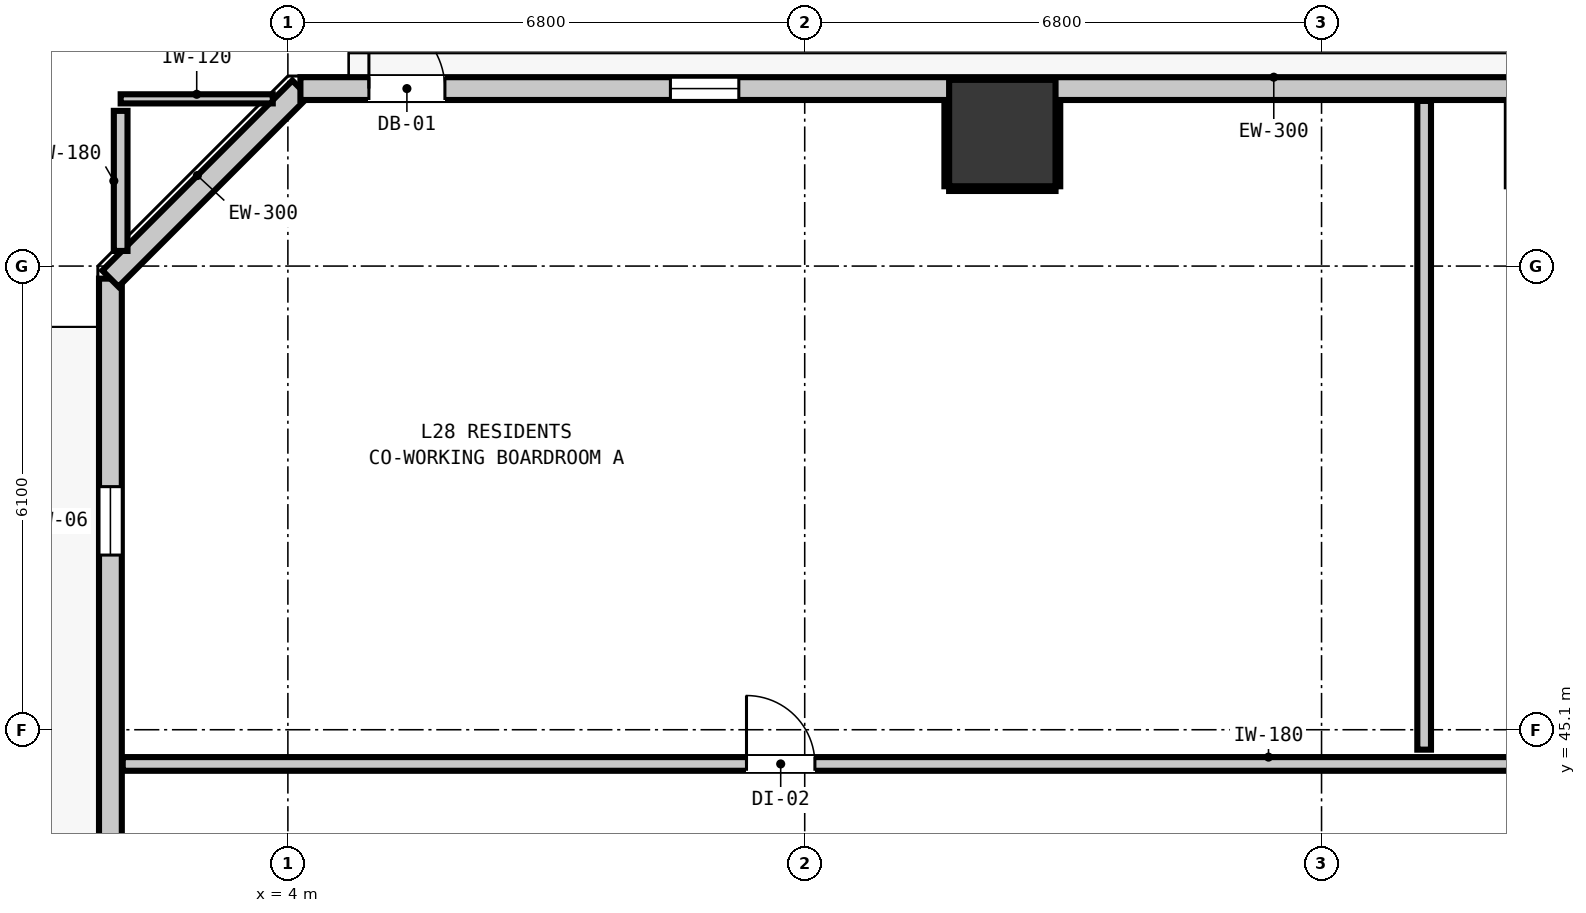
"""IFC4 building model, lengths in metres.
Left out: names, types, materials, properties, quantities, classifications, styles, units other than length and angle.
Written with IfcOpenShell. Run it as: python <this file> out.ifc"""

import sys

from ifc_helpers import new_model, si_unit, direction, frame, frame_2d, origin, origin_2d, place, context, subcontext, project, spatial, rectangle, extrude, element, fill, save


model = new_model("IFC4")
c1 = context("Model", 3, precision=1e-05, world=origin(), true_north=direction((0.0, 1.0)))
c2 = subcontext(c1, "Body", "Model", "MODEL_VIEW")
j1 = project(units=[si_unit("LENGTHUNIT", "METRE"), si_unit("PLANEANGLEUNIT", "RADIAN")], contexts=[c1])
p1 = place(None, origin())
s1 = spatial("IfcSite", under=j1, at=p1, CompositionType="ELEMENT")
p2 = place(p1, origin())
s2 = spatial("IfcBuilding", under=s1, at=p2, CompositionType="ELEMENT")
p3 = place(p2, frame((0.0, 0.0, 99.44)))
s3 = spatial("IfcBuildingStorey", under=s2, at=p3, CompositionType="ELEMENT", Elevation=99.44)
p4 = place(p3, frame((13.4, 52.95, 0.0), z_axis=(0.0, 0.0, 1.0), x_axis=(1.0, 0.0, 0.0)))
e1 = element("IfcColumn", 1, at=p4, inside=s3, PredefinedType="COLUMN", context=c2, shape_type="SweptSolid", body=[
    extrude(rectangle(XDim=1.4, YDim=1.4, at=origin_2d()), origin(), (0.0, 0.0, 1.0), 3.32),
])
p5 = place(p3, frame((1.665, 16.365, 0.0), z_axis=(0.0, 0.0, 1.0), x_axis=(0.0, 1.0, 0.0)))
e2 = element("IfcWall", 2, at=p5, inside=s3, PredefinedType="STANDARD", context=c2, shape_type="SweptSolid", body=[
    extrude(rectangle(XDim=34.67, YDim=0.3, at=frame_2d((17.335, 0.0))), origin(), (0.0, 0.0, 1.0), 3.06),
])
p6 = place(p5, frame((8.955, 0.0, 0.0)))
e3 = element("IfcOpeningElement", 3, at=p6, cuts=e2, PredefinedType="OPENING", context=c2, shape_type="SweptSolid", body=[
    extrude(rectangle(XDim=1.0, YDim=2.15, at=frame_2d((0.5, 1.075))), frame((0.0, 0.16, 0.0), z_axis=(0.0, -1.0, 0.0), x_axis=(1.0, 0.0, 0.0)), (0.0, 0.0, 1.0), 0.32),
])
p7 = place(p5, frame((31.033, 0.0, 0.85)))
e4 = element("IfcOpeningElement", 4, at=p7, cuts=e2, PredefinedType="OPENING", context=c2, shape_type="SweptSolid", body=[
    extrude(rectangle(XDim=0.9, YDim=1.5, at=frame_2d((0.45, 0.75))), frame((0.0, 0.16, 0.0), z_axis=(0.0, -1.0, 0.0), x_axis=(1.0, 0.0, 0.0)), (0.0, 0.0, 1.0), 0.32),
])
p8 = place(p5, frame((10.955, 0.0, 0.85)))
e5 = element("IfcOpeningElement", 5, at=p8, cuts=e2, PredefinedType="OPENING", context=c2, shape_type="SweptSolid", body=[
    extrude(rectangle(XDim=0.9, YDim=1.5, at=frame_2d((0.45, 0.75))), frame((0.0, 0.16, 0.0), z_axis=(0.0, -1.0, 0.0), x_axis=(1.0, 0.0, 0.0)), (0.0, 0.0, 1.0), 0.32),
])
p9 = place(p5, frame((15.485, 0.0, 0.85)))
e6 = element("IfcOpeningElement", 6, at=p9, cuts=e2, PredefinedType="OPENING", context=c2, shape_type="SweptSolid", body=[
    extrude(rectangle(XDim=0.9, YDim=1.5, at=frame_2d((0.45, 0.75))), frame((0.0, 0.16, 0.0), z_axis=(0.0, -1.0, 0.0), x_axis=(1.0, 0.0, 0.0)), (0.0, 0.0, 1.0), 0.32),
])
p10 = place(p3, frame((1.665, 51.035, 0.0), z_axis=(0.0, 0.0, 1.0), x_axis=(0.707106781187, 0.707106781187, 0.0)))
e7 = element("IfcWall", 7, at=p10, inside=s3, PredefinedType="STANDARD", context=c2, shape_type="SweptSolid", body=[
    extrude(rectangle(XDim=3.536, YDim=0.3, at=frame_2d((1.768, 0.0))), origin(), (0.0, 0.0, 1.0), 3.06),
])
p11 = place(p3, frame((4.165, 53.535, 0.0), z_axis=(0.0, 0.0, 1.0), x_axis=(1.0, 0.0, 0.0)))
e8 = element("IfcWall", 8, at=p11, inside=s3, PredefinedType="STANDARD", context=c2, shape_type="SweptSolid", body=[
    extrude(rectangle(XDim=37.47, YDim=0.3, at=frame_2d((18.735, 0.0))), origin(), (0.0, 0.0, 1.0), 3.06),
])
p12 = place(p11, frame((0.901, 0.0, 0.0)))
e9 = element("IfcOpeningElement", 9, at=p12, cuts=e8, PredefinedType="OPENING", context=c2, shape_type="SweptSolid", body=[
    extrude(rectangle(XDim=1.0, YDim=2.15, at=frame_2d((0.5, 1.075))), frame((0.0, 0.16, 0.0), z_axis=(0.0, -1.0, 0.0), x_axis=(1.0, 0.0, 0.0)), (0.0, 0.0, 1.0), 0.32),
])
p13 = place(p11, frame((4.868, 0.0, 0.85)))
e10 = element("IfcOpeningElement", 10, at=p13, cuts=e8, PredefinedType="OPENING", context=c2, shape_type="SweptSolid", body=[
    extrude(rectangle(XDim=0.9, YDim=1.5, at=frame_2d((0.45, 0.75))), frame((0.0, 0.16, 0.0), z_axis=(0.0, -1.0, 0.0), x_axis=(1.0, 0.0, 0.0)), (0.0, 0.0, 1.0), 0.32),
])
p14 = place(p11, frame((19.845, 0.0, 0.85)))
e11 = element("IfcOpeningElement", 11, at=p14, cuts=e8, PredefinedType="OPENING", context=c2, shape_type="SweptSolid", body=[
    extrude(rectangle(XDim=0.9, YDim=1.5, at=frame_2d((0.45, 0.75))), frame((0.0, 0.16, 0.0), z_axis=(0.0, -1.0, 0.0), x_axis=(1.0, 0.0, 0.0)), (0.0, 0.0, 1.0), 0.32),
])
p15 = place(p11, frame((29.567, 0.0, 0.85)))
e12 = element("IfcOpeningElement", 12, at=p15, cuts=e8, PredefinedType="OPENING", context=c2, shape_type="SweptSolid", body=[
    extrude(rectangle(XDim=0.9, YDim=1.5, at=frame_2d((0.45, 0.75))), frame((0.0, 0.16, 0.0), z_axis=(0.0, -1.0, 0.0), x_axis=(1.0, 0.0, 0.0)), (0.0, 0.0, 1.0), 0.32),
])
p16 = place(p11, frame((26.517, 0.0, 0.85)))
e13 = element("IfcOpeningElement", 13, at=p16, cuts=e8, PredefinedType="OPENING", context=c2, shape_type="SweptSolid", body=[
    extrude(rectangle(XDim=0.9, YDim=1.5, at=frame_2d((0.45, 0.75))), frame((0.0, 0.16, 0.0), z_axis=(0.0, -1.0, 0.0), x_axis=(1.0, 0.0, 0.0)), (0.0, 0.0, 1.0), 0.32),
])
p17 = place(p11, frame((35.653, 0.0, 0.85)))
e14 = element("IfcOpeningElement", 14, at=p17, cuts=e8, PredefinedType="OPENING", context=c2, shape_type="SweptSolid", body=[
    extrude(rectangle(XDim=0.9, YDim=1.5, at=frame_2d((0.45, 0.75))), frame((0.0, 0.16, 0.0), z_axis=(0.0, -1.0, 0.0), x_axis=(1.0, 0.0, 0.0)), (0.0, 0.0, 1.0), 0.32),
])
p18 = place(p3, frame((1.827, 44.65, 0.0), z_axis=(0.0, 0.0, 1.0), x_axis=(1.0, 0.0, 0.0)))
e15 = element("IfcWall", 15, at=p18, inside=s3, PredefinedType="PARTITIONING", context=c2, shape_type="SweptSolid", body=[
    extrude(rectangle(XDim=42.146, YDim=0.18, at=frame_2d((21.073, 0.0))), origin(), (0.0, 0.0, 1.0), 3.06),
])
p19 = place(p18, frame((8.207, 0.0, 0.0)))
e16 = element("IfcOpeningElement", 16, at=p19, cuts=e15, PredefinedType="OPENING", context=c2, shape_type="SweptSolid", body=[
    extrude(rectangle(XDim=0.9, YDim=2.1, at=frame_2d((0.45, 1.05))), frame((0.0, 0.1, 0.0), z_axis=(0.0, -1.0, 0.0), x_axis=(1.0, 0.0, 0.0)), (0.0, 0.0, 1.0), 0.2),
])
p20 = place(p18, frame((21.043, 0.0, 0.0)))
e17 = element("IfcOpeningElement", 17, at=p20, cuts=e15, PredefinedType="OPENING", context=c2, shape_type="SweptSolid", body=[
    extrude(rectangle(XDim=0.9, YDim=2.1, at=frame_2d((0.45, 1.05))), frame((0.0, 0.1, 0.0), z_axis=(0.0, -1.0, 0.0), x_axis=(1.0, 0.0, 0.0)), (0.0, 0.0, 1.0), 0.2),
])
p21 = place(p18, frame((33.351, 0.0, 0.0)))
e18 = element("IfcOpeningElement", 18, at=p21, cuts=e15, PredefinedType="OPENING", context=c2, shape_type="SweptSolid", body=[
    extrude(rectangle(XDim=1.0, YDim=2.15, at=frame_2d((0.5, 1.075))), frame((0.0, 0.1, 0.0), z_axis=(0.0, -1.0, 0.0), x_axis=(1.0, 0.0, 0.0)), (0.0, 0.0, 1.0), 0.2),
])
p22 = place(p3, frame((1.8, 53.4, 0.0), z_axis=(0.0, 0.0, 1.0), x_axis=(1.0, 0.0, 0.0)))
e19 = element("IfcWall", 19, at=p22, inside=s3, PredefinedType="PARTITIONING", context=c2, shape_type="SweptSolid", body=[
    extrude(rectangle(XDim=2.001, YDim=0.12, at=frame_2d((1.0, 0.0))), origin(), (0.0, 0.0, 1.0), 3.06),
])
p23 = place(p3, frame((1.8, 51.399, 0.0), z_axis=(0.0, 0.0, 1.0), x_axis=(0.0, 1.0, 0.0)))
e20 = element("IfcWall", 20, at=p23, inside=s3, PredefinedType="PARTITIONING", context=c2, shape_type="SweptSolid", body=[
    extrude(rectangle(XDim=1.843, YDim=0.18, at=frame_2d((0.921, 0.0))), origin(), (0.0, 0.0, 1.0), 3.06),
])
p24 = place(p3, frame((18.95, 44.838, 0.0), z_axis=(0.0, 0.0, 1.0), x_axis=(0.0, 1.0, 0.0)))
e21 = element("IfcWall", 21, at=p24, inside=s3, PredefinedType="PARTITIONING", context=c2, shape_type="SweptSolid", body=[
    extrude(rectangle(XDim=8.535, YDim=0.18, at=frame_2d((4.268, 0.0))), origin(), (0.0, 0.0, 1.0), 3.06),
])
p25 = place(p3, frame((12.7, 52.218, 0.0), z_axis=(0.0, 0.0, 1.0), x_axis=(1.0, 0.0, 0.0)))
e22 = element("IfcWall", 22, at=p25, inside=s3, PredefinedType="PARTITIONING", context=c2, shape_type="SweptSolid", body=[
    extrude(rectangle(XDim=1.4, YDim=0.06, at=frame_2d((0.7, 0.0))), origin(), (0.0, 0.0, 1.0), 1.45),
])
for number, where, z_axis, x_axis in (
    (23, (12.668, 52.25, 0.0), (0.0, 0.0, 1.0), (0.0, 1.0, 0.0)),
    (24, (14.132, 52.25, 0.0), (0.0, 0.0, 1.0), (0.0, 1.0, 0.0)),
):
    element("IfcWall", number, at=place(p3, frame(where, z_axis=z_axis, x_axis=x_axis)), inside=s3, PredefinedType="PARTITIONING", context=c2, shape_type="SweptSolid", body=[
        extrude(rectangle(XDim=1.12, YDim=0.06, at=frame_2d((0.56, 0.0))), origin(), (0.0, 0.0, 1.0), 1.45),
    ])
p26 = place(p12, origin())
e25 = element("IfcDoor", 25, at=p26, inside=s3, OperationType="SINGLE_SWING_LEFT", PredefinedType="DOOR", context=c2, shape_type="SweptSolid", body=[
    extrude(rectangle(XDim=1.0, YDim=2.15, at=frame_2d((0.5, 1.075))), frame((0.0, 0.025, 0.0), z_axis=(0.0, -1.0, 0.0), x_axis=(1.0, 0.0, 0.0)), (0.0, 0.0, 1.0), 0.05),
])
fill(e9, e25)
p27 = place(p7, origin())
e26 = element("IfcWindow", 26, at=p27, inside=s3, PartitioningType="SINGLE_PANEL", PredefinedType="WINDOW", context=c2, shape_type="SweptSolid", body=[
    extrude(rectangle(XDim=0.9, YDim=1.5, at=frame_2d((0.45, 0.75))), frame((0.0, 0.03, 0.0), z_axis=(0.0, -1.0, 0.0), x_axis=(1.0, 0.0, 0.0)), (0.0, 0.0, 1.0), 0.06),
])
fill(e4, e26)
p28 = place(p13, origin())
e27 = element("IfcWindow", 27, at=p28, inside=s3, PartitioningType="SINGLE_PANEL", PredefinedType="WINDOW", context=c2, shape_type="SweptSolid", body=[
    extrude(rectangle(XDim=0.9, YDim=1.5, at=frame_2d((0.45, 0.75))), frame((0.0, 0.03, 0.0), z_axis=(0.0, -1.0, 0.0), x_axis=(1.0, 0.0, 0.0)), (0.0, 0.0, 1.0), 0.06),
])
fill(e10, e27)
p29 = place(p19, origin())
e28 = element("IfcDoor", 28, at=p29, inside=s3, OperationType="SINGLE_SWING_LEFT", PredefinedType="DOOR", context=c2, shape_type="SweptSolid", body=[
    extrude(rectangle(XDim=0.9, YDim=2.1, at=frame_2d((0.45, 1.05))), frame((0.0, 0.025, 0.0), z_axis=(0.0, -1.0, 0.0), x_axis=(1.0, 0.0, 0.0)), (0.0, 0.0, 1.0), 0.05),
])
fill(e16, e28)
save(model, sys.argv[1])
